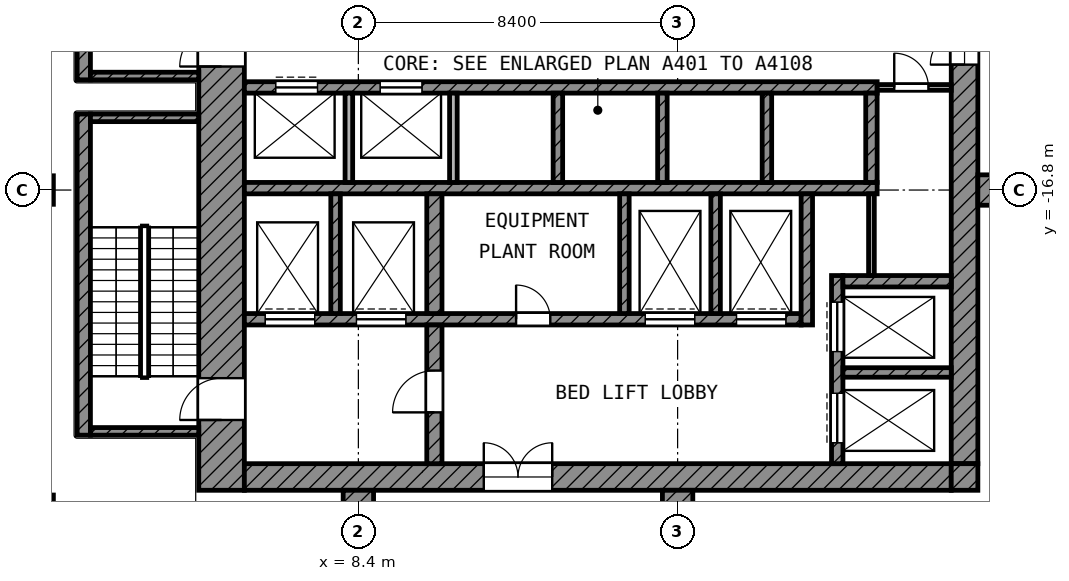
"""IFC4 building model, lengths in metres.
Left out: names, types, materials, properties, quantities, classifications, styles, units other than length and angle.
Written with IfcOpenShell. Run it as: python <this file> out.ifc"""

import sys

from ifc_helpers import new_model, si_unit, direction, frame, frame_2d, origin, origin_2d, place, context, subcontext, project, spatial, rectangle, extrude, element, fill, save


model = new_model("IFC4")
c1 = context("Model", 3, precision=1e-05, world=origin(), true_north=direction((0.0, 1.0)))
c2 = subcontext(c1, "Body", "Model", "MODEL_VIEW")
j1 = project(units=[si_unit("LENGTHUNIT", "METRE"), si_unit("PLANEANGLEUNIT", "RADIAN")], contexts=[c1])
p1 = place(None, origin())
s1 = spatial("IfcSite", under=j1, at=p1, CompositionType="ELEMENT")
p2 = place(p1, origin())
s2 = spatial("IfcBuilding", under=s1, at=p2, CompositionType="ELEMENT")
p3 = place(p2, frame((0.0, 0.0, 272.6)))
s3 = spatial("IfcBuildingStorey", under=s2, at=p3, CompositionType="ELEMENT", Elevation=272.6)
for number, where, z_axis, x_axis in (
    (1, (0.0, -16.8, 0.0), (0.0, 0.0, 1.0), (1.0, 0.0, 0.0)),
    (2, (0.0, -25.2, 0.0), (0.0, 0.0, 1.0), (1.0, 0.0, 0.0)),
):
    element("IfcColumn", number, at=place(p3, frame(where, z_axis=z_axis, x_axis=x_axis)), inside=s3, PredefinedType="COLUMN", context=c2, shape_type="SweptSolid", body=[
        extrude(rectangle(XDim=0.75, YDim=0.75, at=origin_2d()), origin(), (0.0, 0.0, 1.0), 5.0),
    ])
for number, where, z_axis, x_axis in (
    (3, (24.7, -16.8, 0.0), (0.0, 0.0, 1.0), (1.0, 0.0, 0.0)),
    (4, (8.4, -24.7, 0.0), (0.0, 0.0, 1.0), (0.0, -1.0, 0.0)),
    (5, (16.8, -24.7, 0.0), (0.0, 0.0, 1.0), (0.0, -1.0, 0.0)),
):
    element("IfcWall", number, at=place(p3, frame(where, z_axis=z_axis, x_axis=x_axis)), inside=s3, PredefinedType="SHEAR", context=c2, shape_type="SweptSolid", body=[
        extrude(rectangle(XDim=8.5, YDim=0.8, at=frame_2d((4.25, 0.0))), origin(), (0.0, 0.0, 1.0), 4.4),
    ])
p4 = place(p3, frame((4.8, -24.7, 0.0), z_axis=(0.0, 0.0, 1.0), x_axis=(0.0, 1.0, 0.0)))
e6 = element("IfcWall", 6, at=p4, inside=s3, PredefinedType="SHEAR", context=c2, shape_type="SweptSolid", body=[
    extrude(rectangle(XDim=19.3, YDim=1.2, at=frame_2d((9.65, 0.0))), origin(), (0.0, 0.0, 1.0), 4.4),
])
p5 = place(p4, frame((11.15, 0.0, 0.0)))
e7 = element("IfcOpeningElement", 7, at=p5, cuts=e6, PredefinedType="OPENING", context=c2, shape_type="SweptSolid", body=[
    extrude(rectangle(XDim=1.1, YDim=2.1, at=frame_2d((0.55, 1.05))), frame((0.0, 0.61, 0.0), z_axis=(0.0, -1.0, 0.0), x_axis=(1.0, 0.0, 0.0)), (0.0, 0.0, 1.0), 1.22),
])
p6 = place(p4, frame((1.85, 0.0, 0.0)))
e8 = element("IfcOpeningElement", 8, at=p6, cuts=e6, PredefinedType="OPENING", context=c2, shape_type="SweptSolid", body=[
    extrude(rectangle(XDim=1.1, YDim=2.1, at=frame_2d((0.55, 1.05))), frame((0.0, 0.61, 0.0), z_axis=(0.0, -1.0, 0.0), x_axis=(1.0, 0.0, 0.0)), (0.0, 0.0, 1.0), 1.22),
])
p7 = place(p3, frame((24.35, -24.0, 0.0), z_axis=(0.0, 0.0, 1.0), x_axis=(0.0, 1.0, 0.0)))
e9 = element("IfcWall", 9, at=p7, inside=s3, PredefinedType="SHEAR", context=c2, shape_type="SweptSolid", body=[
    extrude(rectangle(XDim=18.6, YDim=0.7, at=frame_2d((9.3, 0.0))), origin(), (0.0, 0.0, 1.0), 4.4),
])
p8 = place(p7, frame((10.5, 0.0, 0.0)))
e10 = element("IfcOpeningElement", 10, at=p8, cuts=e9, PredefinedType="OPENING", context=c2, shape_type="SweptSolid", body=[
    extrude(rectangle(XDim=1.8, YDim=2.1, at=frame_2d((0.9, 1.05))), frame((0.0, 0.36, 0.0), z_axis=(0.0, -1.0, 0.0), x_axis=(1.0, 0.0, 0.0)), (0.0, 0.0, 1.0), 0.72),
])
p9 = place(p3, frame((5.4, -24.35, 0.0), z_axis=(0.0, 0.0, 1.0), x_axis=(1.0, 0.0, 0.0)))
e11 = element("IfcWall", 11, at=p9, inside=s3, PredefinedType="SHEAR", context=c2, shape_type="SweptSolid", body=[
    extrude(rectangle(XDim=18.6, YDim=0.7, at=frame_2d((9.3, 0.0))), origin(), (0.0, 0.0, 1.0), 4.4),
])
p10 = place(p9, frame((6.3, 0.0, 0.0)))
e12 = element("IfcOpeningElement", 12, at=p10, cuts=e11, PredefinedType="OPENING", context=c2, shape_type="SweptSolid", body=[
    extrude(rectangle(XDim=1.8, YDim=2.1, at=frame_2d((0.9, 1.05))), frame((0.0, 0.36, 0.0), z_axis=(0.0, -1.0, 0.0), x_axis=(1.0, 0.0, 0.0)), (0.0, 0.0, 1.0), 0.72),
])
p11 = place(p3, frame((24.35, -24.7, 0.0), z_axis=(0.0, 0.0, 1.0), x_axis=(0.0, 1.0, 0.0)))
e13 = element("IfcWall", 13, at=p11, inside=s3, PredefinedType="SHEAR", context=c2, shape_type="SweptSolid", body=[
    extrude(rectangle(XDim=0.7, YDim=0.7, at=frame_2d((0.35, 0.0))), origin(), (0.0, 0.0, 1.0), 4.4),
])
p12 = place(p3, frame((5.4, -14.1, 0.0), z_axis=(0.0, 0.0, 1.0), x_axis=(1.0, 0.0, 0.0)))
e14 = element("IfcWall", 14, at=p12, inside=s3, PredefinedType="SHEAR", context=c2, shape_type="SweptSolid", body=[
    extrude(rectangle(XDim=16.65, YDim=0.3, at=frame_2d((8.325, 0.0))), origin(), (0.0, 0.0, 1.0), 4.4),
])
p13 = place(p12, frame((0.825, 0.0, 0.0)))
e15 = element("IfcOpeningElement", 15, at=p13, cuts=e14, PredefinedType="OPENING", context=c2, shape_type="SweptSolid", body=[
    extrude(rectangle(XDim=1.1, YDim=2.1, at=frame_2d((0.55, 1.05))), frame((0.0, 0.16, 0.0), z_axis=(0.0, -1.0, 0.0), x_axis=(1.0, 0.0, 0.0)), (0.0, 0.0, 1.0), 0.32),
])
p14 = place(p12, frame((3.575, 0.0, 0.0)))
e16 = element("IfcOpeningElement", 16, at=p14, cuts=e14, PredefinedType="OPENING", context=c2, shape_type="SweptSolid", body=[
    extrude(rectangle(XDim=1.1, YDim=2.1, at=frame_2d((0.55, 1.05))), frame((0.0, 0.16, 0.0), z_axis=(0.0, -1.0, 0.0), x_axis=(1.0, 0.0, 0.0)), (0.0, 0.0, 1.0), 0.32),
])
p15 = place(p3, frame((5.4, -16.75, 0.0), z_axis=(0.0, 0.0, 1.0), x_axis=(1.0, 0.0, 0.0)))
e17 = element("IfcWall", 17, at=p15, inside=s3, PredefinedType="SHEAR", context=c2, shape_type="SweptSolid", body=[
    extrude(rectangle(XDim=16.65, YDim=0.3, at=frame_2d((8.325, 0.0))), origin(), (0.0, 0.0, 1.0), 4.4),
])
p16 = place(p3, frame((5.4, -20.2, 0.0), z_axis=(0.0, 0.0, 1.0), x_axis=(1.0, 0.0, 0.0)))
e18 = element("IfcWall", 18, at=p16, inside=s3, PredefinedType="SHEAR", context=c2, shape_type="SweptSolid", body=[
    extrude(rectangle(XDim=14.65, YDim=0.3, at=frame_2d((7.325, 0.0))), origin(), (0.0, 0.0, 1.0), 4.4),
])
p17 = place(p16, frame((10.55, 0.0, 0.0)))
e19 = element("IfcOpeningElement", 19, at=p17, cuts=e18, PredefinedType="OPENING", context=c2, shape_type="SweptSolid", body=[
    extrude(rectangle(XDim=1.3, YDim=2.1, at=frame_2d((0.65, 1.05))), frame((0.0, 0.16, 0.0), z_axis=(0.0, -1.0, 0.0), x_axis=(1.0, 0.0, 0.0)), (0.0, 0.0, 1.0), 0.32),
])
p18 = place(p16, frame((12.95, 0.0, 0.0)))
e20 = element("IfcOpeningElement", 20, at=p18, cuts=e18, PredefinedType="OPENING", context=c2, shape_type="SweptSolid", body=[
    extrude(rectangle(XDim=1.3, YDim=2.1, at=frame_2d((0.65, 1.05))), frame((0.0, 0.16, 0.0), z_axis=(0.0, -1.0, 0.0), x_axis=(1.0, 0.0, 0.0)), (0.0, 0.0, 1.0), 0.32),
])
p19 = place(p16, frame((0.55, 0.0, 0.0)))
e21 = element("IfcOpeningElement", 21, at=p19, cuts=e18, PredefinedType="OPENING", context=c2, shape_type="SweptSolid", body=[
    extrude(rectangle(XDim=1.3, YDim=2.1, at=frame_2d((0.65, 1.05))), frame((0.0, 0.16, 0.0), z_axis=(0.0, -1.0, 0.0), x_axis=(1.0, 0.0, 0.0)), (0.0, 0.0, 1.0), 0.32),
])
p20 = place(p16, frame((2.95, 0.0, 0.0)))
e22 = element("IfcOpeningElement", 22, at=p20, cuts=e18, PredefinedType="OPENING", context=c2, shape_type="SweptSolid", body=[
    extrude(rectangle(XDim=1.3, YDim=2.1, at=frame_2d((0.65, 1.05))), frame((0.0, 0.16, 0.0), z_axis=(0.0, -1.0, 0.0), x_axis=(1.0, 0.0, 0.0)), (0.0, 0.0, 1.0), 0.32),
])
p21 = place(p16, frame((7.15, 0.0, 0.0)))
e23 = element("IfcOpeningElement", 23, at=p21, cuts=e18, PredefinedType="OPENING", context=c2, shape_type="SweptSolid", body=[
    extrude(rectangle(XDim=0.9, YDim=2.1, at=frame_2d((0.45, 1.05))), frame((0.0, 0.16, 0.0), z_axis=(0.0, -1.0, 0.0), x_axis=(1.0, 0.0, 0.0)), (0.0, 0.0, 1.0), 0.32),
])
p22 = place(p3, frame((10.4, -24.0, 0.0), z_axis=(0.0, 0.0, 1.0), x_axis=(0.0, 1.0, 0.0)))
e24 = element("IfcWall", 24, at=p22, inside=s3, PredefinedType="SHEAR", context=c2, shape_type="SweptSolid", body=[
    extrude(rectangle(XDim=3.65, YDim=0.4, at=frame_2d((1.825, 0.0))), origin(), (0.0, 0.0, 1.0), 4.4),
])
p23 = place(p22, frame((1.35, 0.0, 0.0)))
e25 = element("IfcOpeningElement", 25, at=p23, cuts=e24, PredefinedType="OPENING", context=c2, shape_type="SweptSolid", body=[
    extrude(rectangle(XDim=1.1, YDim=2.1, at=frame_2d((0.55, 1.05))), frame((0.0, 0.21, 0.0), z_axis=(0.0, -1.0, 0.0), x_axis=(1.0, 0.0, 0.0)), (0.0, 0.0, 1.0), 0.42),
])
p24 = place(p3, frame((10.4, -20.05, 0.0), z_axis=(0.0, 0.0, 1.0), x_axis=(0.0, 1.0, 0.0)))
e26 = element("IfcWall", 26, at=p24, inside=s3, PredefinedType="SHEAR", context=c2, shape_type="SweptSolid", body=[
    extrude(rectangle(XDim=3.15, YDim=0.4, at=frame_2d((1.575, 0.0))), origin(), (0.0, 0.0, 1.0), 4.4),
])
p25 = place(p3, frame((20.2, -20.35, 0.0), z_axis=(0.0, 0.0, 1.0), x_axis=(0.0, 1.0, 0.0)))
e27 = element("IfcWall", 27, at=p25, inside=s3, PredefinedType="SHEAR", context=c2, shape_type="SweptSolid", body=[
    extrude(rectangle(XDim=3.45, YDim=0.3, at=frame_2d((1.725, 0.0))), origin(), (0.0, 0.0, 1.0), 4.4),
])
p26 = place(p3, frame((21.9, -16.6, 0.0), z_axis=(0.0, 0.0, 1.0), x_axis=(0.0, 1.0, 0.0)))
e28 = element("IfcWall", 28, at=p26, inside=s3, PredefinedType="SHEAR", context=c2, shape_type="SweptSolid", body=[
    extrude(rectangle(XDim=2.35, YDim=0.3, at=frame_2d((1.175, 0.0))), origin(), (0.0, 0.0, 1.0), 4.4),
])
p27 = place(p3, frame((21.15, -19.2, 0.0), z_axis=(0.0, 0.0, 1.0), x_axis=(1.0, 0.0, 0.0)))
e29 = element("IfcWall", 29, at=p27, inside=s3, PredefinedType="SHEAR", context=c2, shape_type="SweptSolid", body=[
    extrude(rectangle(XDim=2.85, YDim=0.3, at=frame_2d((1.425, 0.0))), origin(), (0.0, 0.0, 1.0), 4.4),
])
p28 = place(p3, frame((21.0, -24.0, 0.0), z_axis=(0.0, 0.0, 1.0), x_axis=(0.0, 1.0, 0.0)))
e30 = element("IfcWall", 30, at=p28, inside=s3, PredefinedType="SHEAR", context=c2, shape_type="SweptSolid", body=[
    extrude(rectangle(XDim=4.95, YDim=0.3, at=frame_2d((2.475, 0.0))), origin(), (0.0, 0.0, 1.0), 4.4),
])
p29 = place(p28, frame((2.95, 0.0, 0.0)))
e31 = element("IfcOpeningElement", 31, at=p29, cuts=e30, PredefinedType="OPENING", context=c2, shape_type="SweptSolid", body=[
    extrude(rectangle(XDim=1.3, YDim=2.1, at=frame_2d((0.65, 1.05))), frame((0.0, 0.16, 0.0), z_axis=(0.0, -1.0, 0.0), x_axis=(1.0, 0.0, 0.0)), (0.0, 0.0, 1.0), 0.32),
])
p30 = place(p28, frame((0.55, 0.0, 0.0)))
e32 = element("IfcOpeningElement", 32, at=p30, cuts=e30, PredefinedType="OPENING", context=c2, shape_type="SweptSolid", body=[
    extrude(rectangle(XDim=1.3, YDim=2.1, at=frame_2d((0.65, 1.05))), frame((0.0, 0.16, 0.0), z_axis=(0.0, -1.0, 0.0), x_axis=(1.0, 0.0, 0.0)), (0.0, 0.0, 1.0), 0.32),
])
p31 = place(p3, frame((21.15, -21.6, 0.0), z_axis=(0.0, 0.0, 1.0), x_axis=(1.0, 0.0, 0.0)))
e33 = element("IfcWall", 33, at=p31, inside=s3, PredefinedType="SHEAR", context=c2, shape_type="SweptSolid", body=[
    extrude(rectangle(XDim=2.85, YDim=0.25, at=frame_2d((1.425, 0.0))), origin(), (0.0, 0.0, 1.0), 4.4),
])
for number, where, z_axis, x_axis in (
    (34, (7.8, -20.05, 0.0), (0.0, 0.0, 1.0), (0.0, 1.0, 0.0)),
    (35, (15.4, -20.05, 0.0), (0.0, 0.0, 1.0), (0.0, 1.0, 0.0)),
    (36, (17.8, -20.05, 0.0), (0.0, 0.0, 1.0), (0.0, 1.0, 0.0)),
):
    element("IfcWall", number, at=place(p3, frame(where, z_axis=z_axis, x_axis=x_axis)), inside=s3, PredefinedType="SHEAR", context=c2, shape_type="SweptSolid", body=[
        extrude(rectangle(XDim=3.15, YDim=0.25, at=frame_2d((1.575, 0.0))), origin(), (0.0, 0.0, 1.0), 4.4),
    ])
for number, where, z_axis, x_axis in (
    (37, (8.15, -16.6, 0.0), (0.0, 0.0, 1.0), (0.0, 1.0, 0.0)),
    (38, (10.9, -16.6, 0.0), (0.0, 0.0, 1.0), (0.0, 1.0, 0.0)),
):
    element("IfcWall", number, at=place(p3, frame(where, z_axis=z_axis, x_axis=x_axis)), inside=s3, PredefinedType="PARTITIONING", context=c2, shape_type="SweptSolid", body=[
        extrude(rectangle(XDim=2.35, YDim=0.2, at=frame_2d((1.175, 0.0))), origin(), (0.0, 0.0, 1.0), 4.4),
    ])
for number, where, z_axis, x_axis in (
    (39, (13.65, -16.6, 0.0), (0.0, 0.0, 1.0), (0.0, 1.0, 0.0)),
    (40, (16.4, -16.6, 0.0), (0.0, 0.0, 1.0), (0.0, 1.0, 0.0)),
    (41, (19.15, -16.6, 0.0), (0.0, 0.0, 1.0), (0.0, 1.0, 0.0)),
):
    element("IfcWall", number, at=place(p3, frame(where, z_axis=z_axis, x_axis=x_axis)), inside=s3, PredefinedType="SHEAR", context=c2, shape_type="SweptSolid", body=[
        extrude(rectangle(XDim=2.35, YDim=0.25, at=frame_2d((1.175, 0.0))), origin(), (0.0, 0.0, 1.0), 4.4),
    ])
p32 = place(p3, frame((21.9, -19.05, 0.0), z_axis=(0.0, 0.0, 1.0), x_axis=(0.0, 1.0, 0.0)))
e42 = element("IfcWall", 42, at=p32, inside=s3, PredefinedType="PARTITIONING", context=c2, shape_type="SweptSolid", body=[
    extrude(rectangle(XDim=2.15, YDim=0.15, at=frame_2d((1.075, 0.0))), origin(), (0.0, 0.0, 1.0), 4.4),
])
p33 = place(p3, frame((22.05, -14.1, 0.0), z_axis=(0.0, 0.0, 1.0), x_axis=(1.0, 0.0, 0.0)))
e43 = element("IfcWall", 43, at=p33, inside=s3, PredefinedType="PARTITIONING", context=c2, shape_type="SweptSolid", body=[
    extrude(rectangle(XDim=1.95, YDim=0.15, at=frame_2d((0.975, 0.0))), origin(), (0.0, 0.0, 1.0), 4.4),
])
p34 = place(p33, frame((0.45, 0.0, 0.0)))
e44 = element("IfcOpeningElement", 44, at=p34, cuts=e43, PredefinedType="OPENING", context=c2, shape_type="SweptSolid", body=[
    extrude(rectangle(XDim=0.9, YDim=2.1, at=frame_2d((0.45, 1.05))), frame((0.0, 0.085, 0.0), z_axis=(0.0, -1.0, 0.0), x_axis=(1.0, 0.0, 0.0)), (0.0, 0.0, 1.0), 0.17),
])
p35 = place(p3, frame((1.175, -13.9, 0.0), z_axis=(0.0, 0.0, 1.0), x_axis=(0.0, 1.0, 0.0)))
e45 = element("IfcWall", 45, at=p35, inside=s3, PredefinedType="SHEAR", context=c2, shape_type="SweptSolid", body=[
    extrude(rectangle(XDim=8.45, YDim=0.35, at=frame_2d((4.225, 0.0))), origin(), (0.0, 0.0, 1.0), 4.4),
])
p36 = place(p3, frame((1.35, -13.8, 0.0), z_axis=(0.0, 0.0, 1.0), x_axis=(1.0, 0.0, 0.0)))
e46 = element("IfcWall", 46, at=p36, inside=s3, PredefinedType="SHEAR", context=c2, shape_type="SweptSolid", body=[
    extrude(rectangle(XDim=2.85, YDim=0.2, at=frame_2d((1.425, 0.0))), origin(), (0.0, 0.0, 1.0), 4.4),
])
p37 = place(p3, frame((1.175, -23.25, 0.0), z_axis=(0.0, 0.0, 1.0), x_axis=(0.0, 1.0, 0.0)))
e47 = element("IfcWall", 47, at=p37, inside=s3, PredefinedType="SHEAR", context=c2, shape_type="SweptSolid", body=[
    extrude(rectangle(XDim=8.45, YDim=0.35, at=frame_2d((4.225, 0.0))), origin(), (0.0, 0.0, 1.0), 4.4),
])
for number, where, z_axis, x_axis in (
    (48, (1.35, -14.9, 0.0), (0.0, 0.0, 1.0), (1.0, 0.0, 0.0)),
    (49, (1.35, -23.15, 0.0), (0.0, 0.0, 1.0), (1.0, 0.0, 0.0)),
):
    element("IfcWall", number, at=place(p3, frame(where, z_axis=z_axis, x_axis=x_axis)), inside=s3, PredefinedType="SHEAR", context=c2, shape_type="SweptSolid", body=[
        extrude(rectangle(XDim=2.85, YDim=0.2, at=frame_2d((1.425, 0.0))), origin(), (0.0, 0.0, 1.0), 4.4),
    ])
p38 = place(p13, origin())
e50 = element("IfcDoor", 50, at=p38, inside=s3, OperationType="DOUBLE_DOOR_SLIDING", PredefinedType="DOOR", context=c2, shape_type="SweptSolid", body=[
    extrude(rectangle(XDim=1.1, YDim=2.1, at=frame_2d((0.55, 1.05))), frame((0.0, 0.025, 0.0), z_axis=(0.0, -1.0, 0.0), x_axis=(1.0, 0.0, 0.0)), (0.0, 0.0, 1.0), 0.05),
])
fill(e15, e50)
p39 = place(p14, origin())
e51 = element("IfcDoor", 51, at=p39, inside=s3, OperationType="DOUBLE_DOOR_SLIDING", PredefinedType="DOOR", context=c2, shape_type="SweptSolid", body=[
    extrude(rectangle(XDim=1.1, YDim=2.1, at=frame_2d((0.55, 1.05))), frame((0.0, 0.025, 0.0), z_axis=(0.0, -1.0, 0.0), x_axis=(1.0, 0.0, 0.0)), (0.0, 0.0, 1.0), 0.05),
])
fill(e16, e51)
p40 = place(p29, origin())
e52 = element("IfcDoor", 52, at=p40, inside=s3, OperationType="DOUBLE_DOOR_SLIDING", PredefinedType="DOOR", context=c2, shape_type="SweptSolid", body=[
    extrude(rectangle(XDim=1.3, YDim=2.1, at=frame_2d((0.65, 1.05))), frame((0.0, 0.025, 0.0), z_axis=(0.0, -1.0, 0.0), x_axis=(1.0, 0.0, 0.0)), (0.0, 0.0, 1.0), 0.05),
])
fill(e31, e52)
p41 = place(p30, origin())
e53 = element("IfcDoor", 53, at=p41, inside=s3, OperationType="DOUBLE_DOOR_SLIDING", PredefinedType="DOOR", context=c2, shape_type="SweptSolid", body=[
    extrude(rectangle(XDim=1.3, YDim=2.1, at=frame_2d((0.65, 1.05))), frame((0.0, 0.025, 0.0), z_axis=(0.0, -1.0, 0.0), x_axis=(1.0, 0.0, 0.0)), (0.0, 0.0, 1.0), 0.05),
])
fill(e32, e53)
p42 = place(p17, origin())
e54 = element("IfcDoor", 54, at=p42, inside=s3, OperationType="DOUBLE_DOOR_SLIDING", PredefinedType="DOOR", context=c2, shape_type="SweptSolid", body=[
    extrude(rectangle(XDim=1.3, YDim=2.1, at=frame_2d((0.65, 1.05))), frame((0.0, 0.025, 0.0), z_axis=(0.0, -1.0, 0.0), x_axis=(1.0, 0.0, 0.0)), (0.0, 0.0, 1.0), 0.05),
])
fill(e19, e54)
p43 = place(p18, origin())
e55 = element("IfcDoor", 55, at=p43, inside=s3, OperationType="DOUBLE_DOOR_SLIDING", PredefinedType="DOOR", context=c2, shape_type="SweptSolid", body=[
    extrude(rectangle(XDim=1.3, YDim=2.1, at=frame_2d((0.65, 1.05))), frame((0.0, 0.025, 0.0), z_axis=(0.0, -1.0, 0.0), x_axis=(1.0, 0.0, 0.0)), (0.0, 0.0, 1.0), 0.05),
])
fill(e20, e55)
p44 = place(p19, origin())
e56 = element("IfcDoor", 56, at=p44, inside=s3, OperationType="DOUBLE_DOOR_SLIDING", PredefinedType="DOOR", context=c2, shape_type="SweptSolid", body=[
    extrude(rectangle(XDim=1.3, YDim=2.1, at=frame_2d((0.65, 1.05))), frame((0.0, 0.025, 0.0), z_axis=(0.0, -1.0, 0.0), x_axis=(1.0, 0.0, 0.0)), (0.0, 0.0, 1.0), 0.05),
])
fill(e21, e56)
p45 = place(p20, origin())
e57 = element("IfcDoor", 57, at=p45, inside=s3, OperationType="DOUBLE_DOOR_SLIDING", PredefinedType="DOOR", context=c2, shape_type="SweptSolid", body=[
    extrude(rectangle(XDim=1.3, YDim=2.1, at=frame_2d((0.65, 1.05))), frame((0.0, 0.025, 0.0), z_axis=(0.0, -1.0, 0.0), x_axis=(1.0, 0.0, 0.0)), (0.0, 0.0, 1.0), 0.05),
])
fill(e22, e57)
p46 = place(p5, origin())
e58 = element("IfcDoor", 58, at=p46, inside=s3, OperationType="SINGLE_SWING_LEFT", PredefinedType="DOOR", context=c2, shape_type="SweptSolid", body=[
    extrude(rectangle(XDim=1.1, YDim=2.1, at=frame_2d((0.55, 1.05))), frame((0.0, 0.025, 0.0), z_axis=(0.0, -1.0, 0.0), x_axis=(1.0, 0.0, 0.0)), (0.0, 0.0, 1.0), 0.05),
])
fill(e7, e58)
p47 = place(p6, origin())
e59 = element("IfcDoor", 59, at=p47, inside=s3, OperationType="SINGLE_SWING_LEFT", PredefinedType="DOOR", context=c2, shape_type="SweptSolid", body=[
    extrude(rectangle(XDim=1.1, YDim=2.1, at=frame_2d((0.55, 1.05))), frame((0.0, 0.025, 0.0), z_axis=(0.0, -1.0, 0.0), x_axis=(1.0, 0.0, 0.0)), (0.0, 0.0, 1.0), 0.05),
])
fill(e8, e59)
p48 = place(p23, origin())
e60 = element("IfcDoor", 60, at=p48, inside=s3, OperationType="SINGLE_SWING_LEFT", PredefinedType="DOOR", context=c2, shape_type="SweptSolid", body=[
    extrude(rectangle(XDim=1.1, YDim=2.1, at=frame_2d((0.55, 1.05))), frame((0.0, 0.025, 0.0), z_axis=(0.0, -1.0, 0.0), x_axis=(1.0, 0.0, 0.0)), (0.0, 0.0, 1.0), 0.05),
])
fill(e25, e60)
p49 = place(p8, origin())
e61 = element("IfcDoor", 61, at=p49, inside=s3, OperationType="DOUBLE_DOOR_SINGLE_SWING", PredefinedType="DOOR", context=c2, shape_type="SweptSolid", body=[
    extrude(rectangle(XDim=1.8, YDim=2.1, at=frame_2d((0.9, 1.05))), frame((0.0, 0.025, 0.0), z_axis=(0.0, -1.0, 0.0), x_axis=(1.0, 0.0, 0.0)), (0.0, 0.0, 1.0), 0.05),
])
fill(e10, e61)
p50 = place(p10, origin())
e62 = element("IfcDoor", 62, at=p50, inside=s3, OperationType="DOUBLE_DOOR_SINGLE_SWING", PredefinedType="DOOR", context=c2, shape_type="SweptSolid", body=[
    extrude(rectangle(XDim=1.8, YDim=2.1, at=frame_2d((0.9, 1.05))), frame((0.0, 0.025, 0.0), z_axis=(0.0, -1.0, 0.0), x_axis=(1.0, 0.0, 0.0)), (0.0, 0.0, 1.0), 0.05),
])
fill(e12, e62)
p51 = place(p34, origin())
e63 = element("IfcDoor", 63, at=p51, inside=s3, OperationType="SINGLE_SWING_LEFT", PredefinedType="DOOR", context=c2, shape_type="SweptSolid", body=[
    extrude(rectangle(XDim=0.9, YDim=2.1, at=frame_2d((0.45, 1.05))), frame((0.0, 0.025, 0.0), z_axis=(0.0, -1.0, 0.0), x_axis=(1.0, 0.0, 0.0)), (0.0, 0.0, 1.0), 0.05),
])
fill(e44, e63)
p52 = place(p21, origin())
e64 = element("IfcDoor", 64, at=p52, inside=s3, OperationType="SINGLE_SWING_LEFT", PredefinedType="DOOR", context=c2, shape_type="SweptSolid", body=[
    extrude(rectangle(XDim=0.9, YDim=2.1, at=frame_2d((0.45, 1.05))), frame((0.0, 0.025, 0.0), z_axis=(0.0, -1.0, 0.0), x_axis=(1.0, 0.0, 0.0)), (0.0, 0.0, 1.0), 0.05),
])
fill(e23, e64)
save(model, sys.argv[1])
